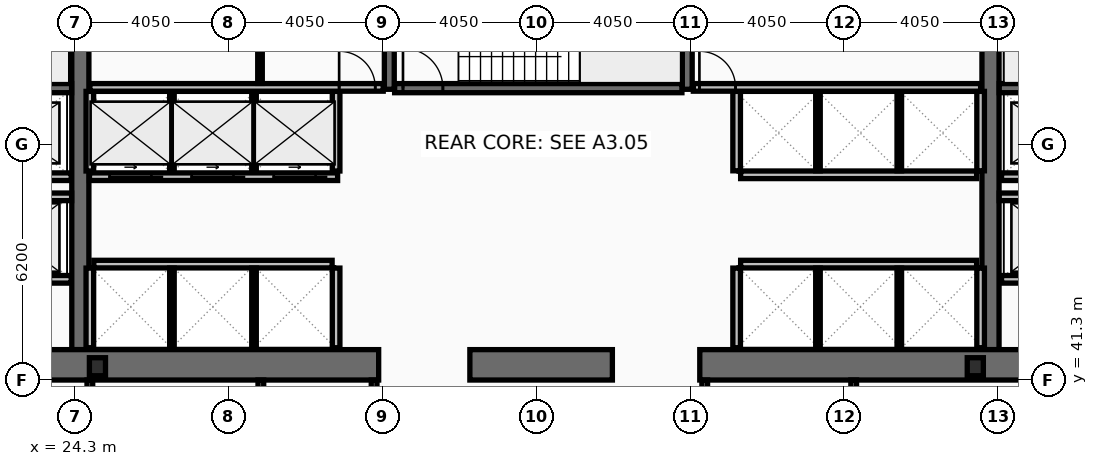
"""IFC4 building model, lengths in metres.
Left out: names, types, materials, properties, quantities, classifications, styles, units other than length and angle.
Written with IfcOpenShell. Run it as: python <this file> out.ifc"""

import sys

from ifc_helpers import new_model, si_unit, direction, frame, frame_2d, origin, origin_2d, place, context, subcontext, project, spatial, rectangle, i_section, extrude, element, fill, save


model = new_model("IFC4")
c1 = context("Model", 3, precision=1e-05, world=origin(), true_north=direction((0.0, 1.0)))
c2 = subcontext(c1, "Body", "Model", "MODEL_VIEW")
j1 = project(units=[si_unit("LENGTHUNIT", "METRE"), si_unit("PLANEANGLEUNIT", "RADIAN")], contexts=[c1])
p1 = place(None, origin())
s1 = spatial("IfcSite", under=j1, at=p1, CompositionType="ELEMENT")
p2 = place(p1, origin())
s2 = spatial("IfcBuilding", under=s1, at=p2, CompositionType="ELEMENT")
p3 = place(p2, frame((0.0, 0.0, 69.8)))
s3 = spatial("IfcBuildingStorey", under=s2, at=p3, CompositionType="ELEMENT", Elevation=69.8)
for number, where, z_axis, x_axis in (
    (1, (24.45, 42.1, 0.0), (0.0, 0.0, 1.0), (0.0, 1.0, 0.0)),
    (2, (48.4, 42.1, 0.0), (0.0, 0.0, 1.0), (0.0, 1.0, 0.0)),
):
    element("IfcWall", number, at=place(p3, frame(where, z_axis=z_axis, x_axis=x_axis)), inside=s3, PredefinedType="SHEAR", context=c2, shape_type="SweptSolid", body=[
        extrude(rectangle(XDim=10.8, YDim=0.45, at=frame_2d((5.4, 0.0))), origin(), (0.0, 0.0, 1.0), 3.82),
    ])
p4 = place(p3, frame((32.3, 41.7, 0.0), z_axis=(0.0, 0.0, 1.0), x_axis=(-1.0, 0.0, 0.0)))
e3 = element("IfcWall", 3, at=p4, inside=s3, PredefinedType="SHEAR", context=c2, shape_type="SweptSolid", body=[
    extrude(rectangle(XDim=11.45, YDim=0.8, at=frame_2d((5.725, 0.0))), origin(), (0.0, 0.0, 1.0), 3.82),
])
p5 = place(p3, frame((38.45, 41.7, 0.0), z_axis=(0.0, 0.0, 1.0), x_axis=(-1.0, 0.0, 0.0)))
e4 = element("IfcWall", 4, at=p5, inside=s3, PredefinedType="SHEAR", context=c2, shape_type="SweptSolid", body=[
    extrude(rectangle(XDim=3.75, YDim=0.8, at=frame_2d((1.875, 0.0))), origin(), (0.0, 0.0, 1.0), 3.82),
])
p6 = place(p3, frame((52.05, 41.7, 0.0), z_axis=(0.0, 0.0, 1.0), x_axis=(-1.0, 0.0, 0.0)))
e5 = element("IfcWall", 5, at=p6, inside=s3, PredefinedType="SHEAR", context=c2, shape_type="SweptSolid", body=[
    extrude(rectangle(XDim=11.3, YDim=0.8, at=frame_2d((5.65, 0.0))), origin(), (0.0, 0.0, 1.0), 3.82),
])
for number, where, z_axis, x_axis in (
    (6, (32.58, 48.95, 0.0), (0.0, 0.0, 1.0), (0.0, 1.0, 0.0)),
    (7, (40.42, 48.95, 0.0), (0.0, 0.0, 1.0), (0.0, 1.0, 0.0)),
):
    element("IfcWall", number, at=place(p3, frame(where, z_axis=z_axis, x_axis=x_axis)), inside=s3, PredefinedType="SHEAR", context=c2, shape_type="SweptSolid", body=[
        extrude(rectangle(XDim=3.95, YDim=0.26, at=frame_2d((1.975, 0.0))), origin(), (0.0, 0.0, 1.0), 3.82),
    ])
p7 = place(p3, frame((17.0, 48.98, 0.0), z_axis=(0.0, 0.0, 1.0), x_axis=(1.0, 0.0, 0.0)))
e8 = element("IfcWall", 8, at=p7, inside=s3, PredefinedType="SHEAR", context=c2, shape_type="SweptSolid", body=[
    extrude(rectangle(XDim=7.22, YDim=0.24, at=frame_2d((3.61, 0.0))), origin(), (0.0, 0.0, 1.0), 3.82),
])
p8 = place(p7, frame((0.22, 0.0, 0.0)))
e9 = element("IfcOpeningElement", 9, at=p8, cuts=e8, PredefinedType="OPENING", context=c2, shape_type="SweptSolid", body=[
    extrude(rectangle(XDim=1.05, YDim=2.15, at=frame_2d((0.525, 1.075))), frame((0.0, 0.13, 0.0), z_axis=(0.0, -1.0, 0.0), x_axis=(1.0, 0.0, 0.0)), (0.0, 0.0, 1.0), 0.26),
])
p9 = place(p3, frame((48.63, 48.98, 0.0), z_axis=(0.0, 0.0, 1.0), x_axis=(1.0, 0.0, 0.0)))
e10 = element("IfcWall", 10, at=p9, inside=s3, PredefinedType="SHEAR", context=c2, shape_type="SweptSolid", body=[
    extrude(rectangle(XDim=7.27, YDim=0.24, at=frame_2d((3.635, 0.0))), origin(), (0.0, 0.0, 1.0), 3.82),
])
p10 = place(p9, frame((6.0, 0.0, 0.0)))
e11 = element("IfcOpeningElement", 11, at=p10, cuts=e10, PredefinedType="OPENING", context=c2, shape_type="SweptSolid", body=[
    extrude(rectangle(XDim=1.05, YDim=2.15, at=frame_2d((0.525, 1.075))), frame((0.0, 0.13, 0.0), z_axis=(0.0, -1.0, 0.0), x_axis=(1.0, 0.0, 0.0)), (0.0, 0.0, 1.0), 0.26),
])
p11 = place(p3, frame((32.72, 48.98, 0.0), z_axis=(0.0, 0.0, 1.0), x_axis=(1.0, 0.0, 0.0)))
e12 = element("IfcWall", 12, at=p11, inside=s3, PredefinedType="SHEAR", context=c2, shape_type="SweptSolid", body=[
    extrude(rectangle(XDim=7.56, YDim=0.24, at=frame_2d((3.78, 0.0))), origin(), (0.0, 0.0, 1.0), 3.82),
])
p12 = place(p11, frame((0.22, 0.0, 0.0)))
e13 = element("IfcOpeningElement", 13, at=p12, cuts=e12, PredefinedType="OPENING", context=c2, shape_type="SweptSolid", body=[
    extrude(rectangle(XDim=1.05, YDim=2.15, at=frame_2d((0.525, 1.075))), frame((0.0, 0.13, 0.0), z_axis=(0.0, -1.0, 0.0), x_axis=(1.0, 0.0, 0.0)), (0.0, 0.0, 1.0), 0.26),
])
for number, where, z_axis, x_axis in (
    (14, (24.9, 41.65, 0.0), (0.0, 0.0, 1.0), (1.0, 0.0, 0.0)),
    (15, (48.0, 41.65, 0.0), (0.0, 0.0, 1.0), (1.0, 0.0, 0.0)),
):
    element("IfcColumn", number, at=place(p3, frame(where, z_axis=z_axis, x_axis=x_axis)), inside=s3, PredefinedType="COLUMN", context=c2, shape_type="SweptSolid", body=[
        extrude(i_section(OverallWidth=0.424, OverallDepth=0.474, WebThickness=0.048, FlangeThickness=0.077, at=origin_2d()), origin(), (0.0, 0.0, 1.0), 4.0),
    ])
p13 = place(p3, frame((51.61, 43.95, 0.0), z_axis=(0.0, 0.0, 1.0), x_axis=(-1.0, 0.0, 0.0)))
e16 = element("IfcWall", 16, at=p13, inside=s3, PredefinedType="PARTITIONING", context=c2, shape_type="SweptSolid", body=[
    extrude(rectangle(XDim=2.92, YDim=0.2, at=frame_2d((1.46, 0.0))), origin(), (0.0, 0.0, 1.0), 3.82),
])
p14 = place(p13, frame((0.81, 0.0, 0.0)))
e17 = element("IfcOpeningElement", 17, at=p14, cuts=e16, PredefinedType="OPENING", context=c2, shape_type="SweptSolid", body=[
    extrude(rectangle(XDim=1.3, YDim=2.18, at=frame_2d((0.65, 1.09))), frame((0.0, 0.11, 0.0), z_axis=(0.0, -1.0, 0.0), x_axis=(1.0, 0.0, 0.0)), (0.0, 0.0, 1.0), 0.22),
])
p15 = place(p3, frame((24.21, 43.95, 0.0), z_axis=(0.0, 0.0, 1.0), x_axis=(-1.0, 0.0, 0.0)))
e18 = element("IfcWall", 18, at=p15, inside=s3, PredefinedType="PARTITIONING", context=c2, shape_type="SweptSolid", body=[
    extrude(rectangle(XDim=2.97, YDim=0.2, at=frame_2d((1.485, 0.0))), origin(), (0.0, 0.0, 1.0), 3.82),
])
p16 = place(p15, frame((0.86, 0.0, 0.0)))
e19 = element("IfcOpeningElement", 19, at=p16, cuts=e18, PredefinedType="OPENING", context=c2, shape_type="SweptSolid", body=[
    extrude(rectangle(XDim=1.3, YDim=2.18, at=frame_2d((0.65, 1.09))), frame((0.0, 0.11, 0.0), z_axis=(0.0, -1.0, 0.0), x_axis=(1.0, 0.0, 0.0)), (0.0, 0.0, 1.0), 0.22),
])
p17 = place(p3, frame((51.61, 46.65, 0.0), z_axis=(0.0, 0.0, 1.0), x_axis=(-1.0, 0.0, 0.0)))
e20 = element("IfcWall", 20, at=p17, inside=s3, PredefinedType="PARTITIONING", context=c2, shape_type="SweptSolid", body=[
    extrude(rectangle(XDim=2.92, YDim=0.2, at=frame_2d((1.46, 0.0))), origin(), (0.0, 0.0, 1.0), 3.82),
])
p18 = place(p17, frame((0.86, 0.0, 0.0)))
e21 = element("IfcOpeningElement", 21, at=p18, cuts=e20, PredefinedType="OPENING", context=c2, shape_type="SweptSolid", body=[
    extrude(rectangle(XDim=1.2, YDim=2.18, at=frame_2d((0.6, 1.09))), frame((0.0, 0.11, 0.0), z_axis=(0.0, -1.0, 0.0), x_axis=(1.0, 0.0, 0.0)), (0.0, 0.0, 1.0), 0.22),
])
p19 = place(p3, frame((24.21, 46.65, 0.0), z_axis=(0.0, 0.0, 1.0), x_axis=(-1.0, 0.0, 0.0)))
e22 = element("IfcWall", 22, at=p19, inside=s3, PredefinedType="PARTITIONING", context=c2, shape_type="SweptSolid", body=[
    extrude(rectangle(XDim=2.97, YDim=0.2, at=frame_2d((1.485, 0.0))), origin(), (0.0, 0.0, 1.0), 3.82),
])
p20 = place(p19, frame((0.91, 0.0, 0.0)))
e23 = element("IfcOpeningElement", 23, at=p20, cuts=e22, PredefinedType="OPENING", context=c2, shape_type="SweptSolid", body=[
    extrude(rectangle(XDim=1.2, YDim=2.18, at=frame_2d((0.6, 1.09))), frame((0.0, 0.11, 0.0), z_axis=(0.0, -1.0, 0.0), x_axis=(1.0, 0.0, 0.0)), (0.0, 0.0, 1.0), 0.22),
])
p21 = place(p3, frame((31.22, 46.65, 0.0), z_axis=(0.0, 0.0, 1.0), x_axis=(-1.0, 0.0, 0.0)))
e24 = element("IfcWall", 24, at=p21, inside=s3, PredefinedType="PARTITIONING", context=c2, shape_type="SweptSolid", body=[
    extrude(rectangle(XDim=6.53, YDim=0.2, at=frame_2d((3.265, 0.0))), origin(), (0.0, 0.0, 1.0), 3.82),
])
p22 = place(p21, frame((4.9, 0.0, 0.0)))
e25 = element("IfcOpeningElement", 25, at=p22, cuts=e24, PredefinedType="OPENING", context=c2, shape_type="SweptSolid", body=[
    extrude(rectangle(XDim=1.1, YDim=2.18, at=frame_2d((0.55, 1.09))), frame((0.0, 0.11, 0.0), z_axis=(0.0, -1.0, 0.0), x_axis=(1.0, 0.0, 0.0)), (0.0, 0.0, 1.0), 0.22),
])
p23 = place(p21, frame((2.74, 0.0, 0.0)))
e26 = element("IfcOpeningElement", 26, at=p23, cuts=e24, PredefinedType="OPENING", context=c2, shape_type="SweptSolid", body=[
    extrude(rectangle(XDim=1.1, YDim=2.18, at=frame_2d((0.55, 1.09))), frame((0.0, 0.11, 0.0), z_axis=(0.0, -1.0, 0.0), x_axis=(1.0, 0.0, 0.0)), (0.0, 0.0, 1.0), 0.22),
])
p24 = place(p21, frame((0.58, 0.0, 0.0)))
e27 = element("IfcOpeningElement", 27, at=p24, cuts=e24, PredefinedType="OPENING", context=c2, shape_type="SweptSolid", body=[
    extrude(rectangle(XDim=1.1, YDim=2.18, at=frame_2d((0.55, 1.09))), frame((0.0, 0.11, 0.0), z_axis=(0.0, -1.0, 0.0), x_axis=(1.0, 0.0, 0.0)), (0.0, 0.0, 1.0), 0.22),
])
p25 = place(p3, frame((21.2, 46.12, 0.0), z_axis=(0.0, 0.0, 1.0), x_axis=(1.0, 0.0, 0.0)))
e28 = element("IfcWall", 28, at=p25, inside=s3, PredefinedType="PARTITIONING", context=c2, shape_type="SweptSolid", body=[
    extrude(rectangle(XDim=3.02, YDim=0.2, at=frame_2d((1.51, 0.0))), origin(), (0.0, 0.0, 1.0), 3.82),
])
p26 = place(p3, frame((48.63, 46.12, 0.0), z_axis=(0.0, 0.0, 1.0), x_axis=(1.0, 0.0, 0.0)))
e29 = element("IfcWall", 29, at=p26, inside=s3, PredefinedType="PARTITIONING", context=c2, shape_type="SweptSolid", body=[
    extrude(rectangle(XDim=3.07, YDim=0.2, at=frame_2d((1.535, 0.0))), origin(), (0.0, 0.0, 1.0), 3.82),
])
for number, where, z_axis, x_axis in (
    (30, (24.7, 46.8, 0.0), (0.0, 0.0, 1.0), (0.0, 1.0, 0.0)),
    (31, (31.18, 46.8, 0.0), (0.0, 0.0, 1.0), (0.0, 1.0, 0.0)),
):
    element("IfcWall", number, at=place(p3, frame(where, z_axis=z_axis, x_axis=x_axis)), inside=s3, PredefinedType="PARTITIONING", context=c2, shape_type="SweptSolid", body=[
        extrude(rectangle(XDim=2.095, YDim=0.2, at=frame_2d((1.047, 0.0))), origin(), (0.0, 0.0, 1.0), 3.82),
    ])
for number, where, z_axis, x_axis in (
    (32, (26.86, 46.8, 0.0), (0.0, 0.0, 1.0), (0.0, 1.0, 0.0)),
    (33, (29.02, 46.8, 0.0), (0.0, 0.0, 1.0), (0.0, 1.0, 0.0)),
):
    element("IfcWall", number, at=place(p3, frame(where, z_axis=z_axis, x_axis=x_axis)), inside=s3, PredefinedType="PARTITIONING", context=c2, shape_type="SweptSolid", body=[
        extrude(rectangle(XDim=2.095, YDim=0.12, at=frame_2d((1.047, 0.0))), origin(), (0.0, 0.0, 1.0), 3.82),
    ])
p27 = place(p3, frame((24.805, 44.35, 0.0), z_axis=(0.0, 0.0, 1.0), x_axis=(1.0, 0.0, 0.0)))
e34 = element("IfcWall", 34, at=p27, inside=s3, PredefinedType="PARTITIONING", context=c2, shape_type="SweptSolid", body=[
    extrude(rectangle(XDim=6.27, YDim=0.2, at=frame_2d((3.135, 0.0))), origin(), (0.0, 0.0, 1.0), 3.82),
])
for number, where, z_axis, x_axis in (
    (35, (24.7, 42.15, 0.0), (0.0, 0.0, 1.0), (0.0, 1.0, 0.0)),
    (36, (31.18, 42.15, 0.0), (0.0, 0.0, 1.0), (0.0, 1.0, 0.0)),
):
    element("IfcWall", number, at=place(p3, frame(where, z_axis=z_axis, x_axis=x_axis)), inside=s3, PredefinedType="PARTITIONING", context=c2, shape_type="SweptSolid", body=[
        extrude(rectangle(XDim=2.095, YDim=0.2, at=frame_2d((1.048, 0.0))), origin(), (0.0, 0.0, 1.0), 3.82),
    ])
for number, where, z_axis, x_axis in (
    (37, (26.86, 42.15, 0.0), (0.0, 0.0, 1.0), (0.0, 1.0, 0.0)),
    (38, (29.02, 42.15, 0.0), (0.0, 0.0, 1.0), (0.0, 1.0, 0.0)),
):
    element("IfcWall", number, at=place(p3, frame(where, z_axis=z_axis, x_axis=x_axis)), inside=s3, PredefinedType="PARTITIONING", context=c2, shape_type="SweptSolid", body=[
        extrude(rectangle(XDim=2.095, YDim=0.12, at=frame_2d((1.048, 0.0))), origin(), (0.0, 0.0, 1.0), 3.82),
    ])
p28 = place(p3, frame((41.825, 46.7, 0.0), z_axis=(0.0, 0.0, 1.0), x_axis=(1.0, 0.0, 0.0)))
e39 = element("IfcWall", 39, at=p28, inside=s3, PredefinedType="PARTITIONING", context=c2, shape_type="SweptSolid", body=[
    extrude(rectangle(XDim=6.21, YDim=0.2, at=frame_2d((3.105, 0.0))), origin(), (0.0, 0.0, 1.0), 3.82),
])
for number, where, z_axis, x_axis in (
    (40, (41.72, 46.805, 0.0), (0.0, 0.0, 1.0), (0.0, 1.0, 0.0)),
    (41, (48.14, 46.805, 0.0), (0.0, 0.0, 1.0), (0.0, 1.0, 0.0)),
):
    element("IfcWall", number, at=place(p3, frame(where, z_axis=z_axis, x_axis=x_axis)), inside=s3, PredefinedType="PARTITIONING", context=c2, shape_type="SweptSolid", body=[
        extrude(rectangle(XDim=2.09, YDim=0.2, at=frame_2d((1.045, 0.0))), origin(), (0.0, 0.0, 1.0), 3.82),
    ])
for number, where, z_axis, x_axis in (
    (42, (43.86, 46.805, 0.0), (0.0, 0.0, 1.0), (0.0, 1.0, 0.0)),
    (43, (46.0, 46.805, 0.0), (0.0, 0.0, 1.0), (0.0, 1.0, 0.0)),
):
    element("IfcWall", number, at=place(p3, frame(where, z_axis=z_axis, x_axis=x_axis)), inside=s3, PredefinedType="PARTITIONING", context=c2, shape_type="SweptSolid", body=[
        extrude(rectangle(XDim=2.09, YDim=0.12, at=frame_2d((1.045, 0.0))), origin(), (0.0, 0.0, 1.0), 3.82),
    ])
p29 = place(p3, frame((41.825, 44.35, 0.0), z_axis=(0.0, 0.0, 1.0), x_axis=(1.0, 0.0, 0.0)))
e44 = element("IfcWall", 44, at=p29, inside=s3, PredefinedType="PARTITIONING", context=c2, shape_type="SweptSolid", body=[
    extrude(rectangle(XDim=6.21, YDim=0.2, at=frame_2d((3.105, 0.0))), origin(), (0.0, 0.0, 1.0), 3.82),
])
for number, where, z_axis, x_axis in (
    (45, (41.72, 42.15, 0.0), (0.0, 0.0, 1.0), (0.0, 1.0, 0.0)),
    (46, (48.14, 42.15, 0.0), (0.0, 0.0, 1.0), (0.0, 1.0, 0.0)),
):
    element("IfcWall", number, at=place(p3, frame(where, z_axis=z_axis, x_axis=x_axis)), inside=s3, PredefinedType="PARTITIONING", context=c2, shape_type="SweptSolid", body=[
        extrude(rectangle(XDim=2.095, YDim=0.2, at=frame_2d((1.048, 0.0))), origin(), (0.0, 0.0, 1.0), 3.82),
    ])
for number, where, z_axis, x_axis in (
    (47, (43.86, 42.15, 0.0), (0.0, 0.0, 1.0), (0.0, 1.0, 0.0)),
    (48, (46.0, 42.15, 0.0), (0.0, 0.0, 1.0), (0.0, 1.0, 0.0)),
):
    element("IfcWall", number, at=place(p3, frame(where, z_axis=z_axis, x_axis=x_axis)), inside=s3, PredefinedType="PARTITIONING", context=c2, shape_type="SweptSolid", body=[
        extrude(rectangle(XDim=2.095, YDim=0.12, at=frame_2d((1.048, 0.0))), origin(), (0.0, 0.0, 1.0), 3.82),
    ])
p30 = place(p3, frame((24.7, 49.0, 0.0), z_axis=(0.0, 0.0, 1.0), x_axis=(1.0, 0.0, 0.0)))
e49 = element("IfcWall", 49, at=p30, inside=s3, PredefinedType="PARTITIONING", context=c2, shape_type="SweptSolid", body=[
    extrude(rectangle(XDim=7.72, YDim=0.2, at=frame_2d((3.86, 0.0))), origin(), (0.0, 0.0, 1.0), 3.82),
])
p31 = place(p30, frame((6.56, 0.0, 0.0)))
e50 = element("IfcOpeningElement", 50, at=p31, cuts=e49, PredefinedType="OPENING", context=c2, shape_type="SweptSolid", body=[
    extrude(rectangle(XDim=0.95, YDim=2.1, at=frame_2d((0.475, 1.05))), frame((0.0, 0.11, 0.0), z_axis=(0.0, -1.0, 0.0), x_axis=(1.0, 0.0, 0.0)), (0.0, 0.0, 1.0), 0.22),
])
p32 = place(p3, frame((29.177, 49.105, 0.0), z_axis=(0.0, 0.0, 1.0), x_axis=(0.0, 1.0, 0.0)))
e51 = element("IfcWall", 51, at=p32, inside=s3, PredefinedType="PARTITIONING", context=c2, shape_type="SweptSolid", body=[
    extrude(rectangle(XDim=3.69, YDim=0.12, at=frame_2d((1.845, 0.0))), origin(), (0.0, 0.0, 1.0), 3.82),
])
p33 = place(p32, frame((1.05, 0.0, 0.0)))
e52 = element("IfcOpeningElement", 52, at=p33, cuts=e51, PredefinedType="OPENING", context=c2, shape_type="SweptSolid", body=[
    extrude(rectangle(XDim=0.9, YDim=2.05, at=frame_2d((0.45, 1.025))), frame((0.0, 0.07, 0.0), z_axis=(0.0, -1.0, 0.0), x_axis=(1.0, 0.0, 0.0)), (0.0, 0.0, 1.0), 0.14),
])
p34 = place(p3, frame((40.58, 49.0, 0.0), z_axis=(0.0, 0.0, 1.0), x_axis=(1.0, 0.0, 0.0)))
e53 = element("IfcWall", 53, at=p34, inside=s3, PredefinedType="PARTITIONING", context=c2, shape_type="SweptSolid", body=[
    extrude(rectangle(XDim=7.56, YDim=0.2, at=frame_2d((3.78, 0.0))), origin(), (0.0, 0.0, 1.0), 3.82),
])
p35 = place(p34, frame((0.16, 0.0, 0.0)))
e54 = element("IfcOpeningElement", 54, at=p35, cuts=e53, PredefinedType="OPENING", context=c2, shape_type="SweptSolid", body=[
    extrude(rectangle(XDim=0.95, YDim=2.1, at=frame_2d((0.475, 1.05))), frame((0.0, 0.11, 0.0), z_axis=(0.0, -1.0, 0.0), x_axis=(1.0, 0.0, 0.0)), (0.0, 0.0, 1.0), 0.22),
])
p36 = place(p3, frame((24.7, 38.28, 0.0), z_axis=(0.0, 0.0, 1.0), x_axis=(0.0, 1.0, 0.0)))
e55 = element("IfcWall", 55, at=p36, inside=s3, PredefinedType="PARTITIONING", context=c2, shape_type="SweptSolid", body=[
    extrude(rectangle(XDim=3.02, YDim=0.15, at=frame_2d((1.51, 0.0))), origin(), (0.0, 0.0, 1.0), 3.01),
])
for number, where, z_axis, x_axis in (
    (56, (29.2, 38.28, 0.0), (0.0, 0.0, 1.0), (0.0, 1.0, 0.0)),
    (57, (32.18, 38.28, 0.0), (0.0, 0.0, 1.0), (0.0, 1.0, 0.0)),
    (58, (40.88, 38.28, 0.0), (0.0, 0.0, 1.0), (0.0, 1.0, 0.0)),
    (59, (44.8, 38.28, 0.0), (0.0, 0.0, 1.0), (0.0, 1.0, 0.0)),
):
    element("IfcWall", number, at=place(p3, frame(where, z_axis=z_axis, x_axis=x_axis)), inside=s3, PredefinedType="PARTITIONING", context=c2, shape_type="SweptSolid", body=[
        extrude(rectangle(XDim=3.02, YDim=0.15, at=frame_2d((1.51, 0.0))), origin(), (0.0, 0.0, 1.0), 3.82),
    ])
p37 = place(p12, origin())
e60 = element("IfcDoor", 60, at=p37, inside=s3, OperationType="SINGLE_SWING_LEFT", PredefinedType="DOOR", context=c2, shape_type="SweptSolid", body=[
    extrude(rectangle(XDim=1.05, YDim=2.15, at=frame_2d((0.525, 1.075))), frame((0.0, 0.025, 0.0), z_axis=(0.0, -1.0, 0.0), x_axis=(1.0, 0.0, 0.0)), (0.0, 0.0, 1.0), 0.05),
])
fill(e13, e60)
p38 = place(p22, origin())
e61 = element("IfcDoor", 61, at=p38, inside=s3, OperationType="SLIDING_TO_LEFT", PredefinedType="DOOR", context=c2, shape_type="SweptSolid", body=[
    extrude(rectangle(XDim=1.1, YDim=2.18, at=frame_2d((0.55, 1.09))), frame((0.0, 0.025, 0.0), z_axis=(0.0, -1.0, 0.0), x_axis=(1.0, 0.0, 0.0)), (0.0, 0.0, 1.0), 0.05),
])
fill(e25, e61)
p39 = place(p23, origin())
e62 = element("IfcDoor", 62, at=p39, inside=s3, OperationType="SLIDING_TO_LEFT", PredefinedType="DOOR", context=c2, shape_type="SweptSolid", body=[
    extrude(rectangle(XDim=1.1, YDim=2.18, at=frame_2d((0.55, 1.09))), frame((0.0, 0.025, 0.0), z_axis=(0.0, -1.0, 0.0), x_axis=(1.0, 0.0, 0.0)), (0.0, 0.0, 1.0), 0.05),
])
fill(e26, e62)
p40 = place(p24, origin())
e63 = element("IfcDoor", 63, at=p40, inside=s3, OperationType="SLIDING_TO_LEFT", PredefinedType="DOOR", context=c2, shape_type="SweptSolid", body=[
    extrude(rectangle(XDim=1.1, YDim=2.18, at=frame_2d((0.55, 1.09))), frame((0.0, 0.025, 0.0), z_axis=(0.0, -1.0, 0.0), x_axis=(1.0, 0.0, 0.0)), (0.0, 0.0, 1.0), 0.05),
])
fill(e27, e63)
p41 = place(p31, origin())
e64 = element("IfcDoor", 64, at=p41, inside=s3, OperationType="SINGLE_SWING_LEFT", PredefinedType="DOOR", context=c2, shape_type="SweptSolid", body=[
    extrude(rectangle(XDim=0.95, YDim=2.1, at=frame_2d((0.475, 1.05))), frame((0.0, 0.025, 0.0), z_axis=(0.0, -1.0, 0.0), x_axis=(1.0, 0.0, 0.0)), (0.0, 0.0, 1.0), 0.05),
])
fill(e50, e64)
p42 = place(p35, origin())
e65 = element("IfcDoor", 65, at=p42, inside=s3, OperationType="SINGLE_SWING_LEFT", PredefinedType="DOOR", context=c2, shape_type="SweptSolid", body=[
    extrude(rectangle(XDim=0.95, YDim=2.1, at=frame_2d((0.475, 1.05))), frame((0.0, 0.025, 0.0), z_axis=(0.0, -1.0, 0.0), x_axis=(1.0, 0.0, 0.0)), (0.0, 0.0, 1.0), 0.05),
])
fill(e54, e65)
save(model, sys.argv[1])
